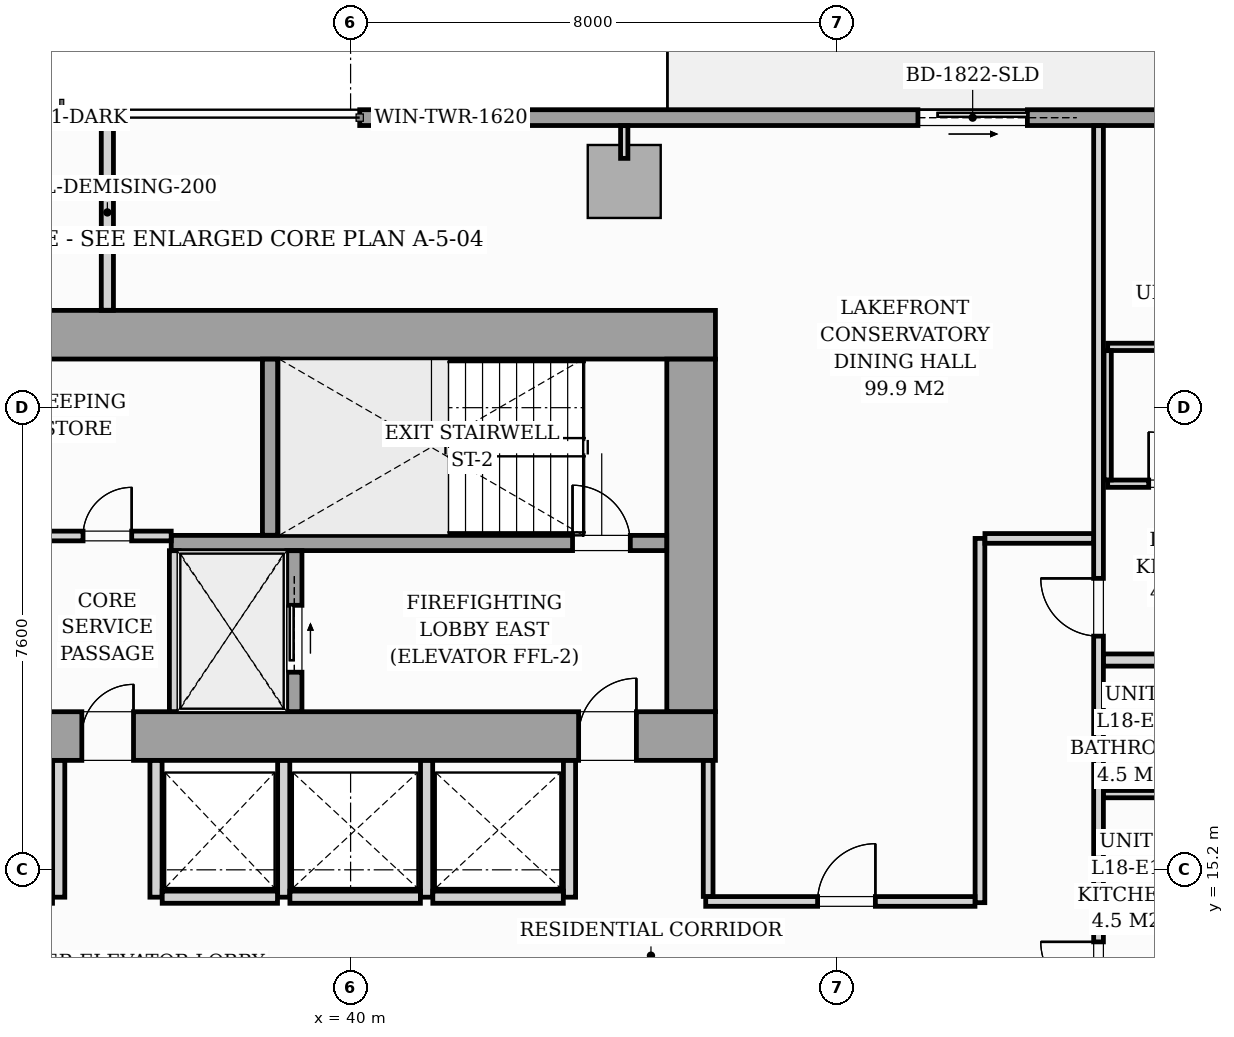
"""IFC4 building model, lengths in metres.
Left out: names, types, materials, properties, quantities, classifications, styles, units other than length and angle.
Written with IfcOpenShell. Run it as: python <this file> out.ifc"""

import sys

from ifc_helpers import new_model, si_unit, direction, frame, frame_2d, origin, origin_2d, place, context, subcontext, project, spatial, rectangle, i_section, extrude, source, transform, mapped, element, fill, save


model = new_model("IFC4")
c1 = context("Model", 3, precision=1e-05, world=origin(), true_north=direction((0.0, 1.0)))
c2 = subcontext(c1, "Body", "Model", "MODEL_VIEW")
j1 = project(units=[si_unit("LENGTHUNIT", "METRE"), si_unit("PLANEANGLEUNIT", "RADIAN")], contexts=[c1])
p1 = place(None, origin())
s1 = spatial("IfcSite", under=j1, at=p1, CompositionType="ELEMENT")
p2 = place(p1, origin())
s2 = spatial("IfcBuilding", under=s1, at=p2, CompositionType="ELEMENT")
p3 = place(p2, frame((0.0, 0.0, 64.6)))
s3 = spatial("IfcBuildingStorey", under=s2, at=p3, CompositionType="ELEMENT", Elevation=64.6)
m1 = source(origin(), c2, "Body", "SweptSolid", [
    extrude(i_section(OverallWidth=0.437, OverallDepth=0.514, WebThickness=0.061, FlangeThickness=0.097, FilletRadius=0.018, at=origin_2d()), origin(), (0.0, 0.0, 1.0), 3.196),
])
for number, where, z_axis, x_axis in (
    (1, (38.88, 17.4, 0.002), (0.0, 0.0, 1.0), (1.0, 0.0, 0.0)),
    (2, (45.6, 17.4, 0.002), (0.0, 0.0, 1.0), (1.0, 0.0, 0.0)),
    (3, (38.88, 24.0, 0.002), (0.0, 0.0, 1.0), (1.0, 0.0, 0.0)),
    (4, (45.6, 24.0, 0.002), (0.0, 0.0, 1.0), (1.0, 0.0, 0.0)),
):
    element("IfcColumn", number, at=place(p3, frame(where, z_axis=z_axis, x_axis=x_axis)), inside=s3, PredefinedType="PILASTER", context=c2, shape_type="MappedRepresentation", body=[
        mapped(m1, transform((0.0, 0.0, 0.0), scale=1.0)),
    ])
m2 = source(origin(), c2, "Body", "SweptSolid", [
    extrude(rectangle(XDim=1.2, YDim=1.2, at=origin_2d()), origin(), (0.0, 0.0, 1.0), 3.194),
])
p4 = place(p3, frame((44.5, 26.52, 0.002), z_axis=(0.0, 0.0, 1.0), x_axis=(1.0, 0.0, 0.0)))
e5 = element("IfcColumn", 5, at=p4, inside=s3, PredefinedType="COLUMN", context=c2, shape_type="MappedRepresentation", body=[
    mapped(m2, transform((0.0, 0.0, 0.0), scale=1.0)),
])
p5 = place(p3, frame((40.15, 27.57, 0.0), z_axis=(0.0, 0.0, 1.0), x_axis=(1.0, 0.0, 0.0)))
e6 = element("IfcWall", 6, at=p5, inside=s3, PredefinedType="STANDARD", context=c2, shape_type="SweptSolid", body=[
    extrude(rectangle(XDim=17.15, YDim=0.26, at=frame_2d((8.575, 0.0))), origin(), (0.0, 0.0, 1.0), 2.9),
])
p6 = place(p5, frame((9.18, 0.0, 0.0)))
e7 = element("IfcOpeningElement", 7, at=p6, cuts=e6, PredefinedType="OPENING", context=c2, shape_type="SweptSolid", body=[
    extrude(rectangle(XDim=1.8, YDim=2.06, at=frame_2d((0.9, 1.03))), frame((0.0, 0.14, 0.0), z_axis=(0.0, -1.0, 0.0), x_axis=(1.0, 0.0, 0.0)), (0.0, 0.0, 1.0), 0.28),
])
p7 = place(p5, frame((0.7, 0.0, 0.65)))
e8 = element("IfcOpeningElement", 8, at=p7, cuts=e6, PredefinedType="OPENING", context=c2, shape_type="SweptSolid", body=[
    extrude(rectangle(XDim=1.6, YDim=1.5, at=frame_2d((0.8, 0.75))), frame((0.0, 0.14, 0.0), z_axis=(0.0, -1.0, 0.0), x_axis=(1.0, 0.0, 0.0)), (0.0, 0.0, 1.0), 0.28),
])
p8 = place(p3, frame((26.0, 17.4, 0.0), z_axis=(0.0, 0.0, 1.0), x_axis=(1.0, 0.0, 0.0)))
e9 = element("IfcWall", 9, at=p8, inside=s3, PredefinedType="SHEAR", context=c2, shape_type="SweptSolid", body=[
    extrude(rectangle(XDim=20.0, YDim=0.8, at=frame_2d((10.0, 0.0))), origin(), (0.0, 0.0, 1.0), 3.2),
])
p9 = place(p8, frame((1.15, 0.0, 0.0)))
e10 = element("IfcOpeningElement", 10, at=p9, cuts=e9, PredefinedType="OPENING", context=c2, shape_type="SweptSolid", body=[
    extrude(rectangle(XDim=0.95, YDim=2.06, at=frame_2d((0.475, 1.03))), frame((0.0, 0.41, 0.0), z_axis=(0.0, -1.0, 0.0), x_axis=(1.0, 0.0, 0.0)), (0.0, 0.0, 1.0), 0.82),
])
p10 = place(p8, frame((9.58, 0.0, 0.0)))
e11 = element("IfcOpeningElement", 11, at=p10, cuts=e9, PredefinedType="OPENING", context=c2, shape_type="SweptSolid", body=[
    extrude(rectangle(XDim=0.85, YDim=2.0, at=frame_2d((0.425, 1.0))), frame((0.0, 0.41, 0.0), z_axis=(0.0, -1.0, 0.0), x_axis=(1.0, 0.0, 0.0)), (0.0, 0.0, 1.0), 0.82),
])
p11 = place(p8, frame((17.75, 0.0, 0.0)))
e12 = element("IfcOpeningElement", 12, at=p11, cuts=e9, PredefinedType="OPENING", context=c2, shape_type="SweptSolid", body=[
    extrude(rectangle(XDim=0.95, YDim=2.06, at=frame_2d((0.475, 1.03))), frame((0.0, 0.41, 0.0), z_axis=(0.0, -1.0, 0.0), x_axis=(1.0, 0.0, 0.0)), (0.0, 0.0, 1.0), 0.82),
])
p12 = place(p3, frame((26.0, 24.0, 0.0), z_axis=(0.0, 0.0, 1.0), x_axis=(1.0, 0.0, 0.0)))
e13 = element("IfcWall", 13, at=p12, inside=s3, PredefinedType="SHEAR", context=c2, shape_type="SweptSolid", body=[
    extrude(rectangle(XDim=20.0, YDim=0.8, at=frame_2d((10.0, 0.0))), origin(), (0.0, 0.0, 1.0), 3.2),
])
p13 = place(p3, frame((45.6, 17.802, 0.0), z_axis=(0.0, 0.0, 1.0), x_axis=(0.0, 1.0, 0.0)))
e14 = element("IfcWall", 14, at=p13, inside=s3, PredefinedType="SHEAR", context=c2, shape_type="SweptSolid", body=[
    extrude(rectangle(XDim=5.796, YDim=0.8, at=frame_2d((2.898, 0.0))), origin(), (0.0, 0.0, 1.0), 3.2),
])
p14 = place(p3, frame((37.05, 20.575, 0.0), z_axis=(0.0, 0.0, 1.0), x_axis=(1.0, 0.0, 0.0)))
e15 = element("IfcWall", 15, at=p14, inside=s3, PredefinedType="SOLIDWALL", context=c2, shape_type="SweptSolid", body=[
    extrude(rectangle(XDim=8.148, YDim=0.25, at=frame_2d((4.074, 0.0))), origin(), (0.0, 0.0, 1.0), 3.2),
])
p15 = place(p14, frame((6.6, 0.0, 0.0)))
e16 = element("IfcOpeningElement", 16, at=p15, cuts=e15, PredefinedType="OPENING", context=c2, shape_type="SweptSolid", body=[
    extrude(rectangle(XDim=0.95, YDim=2.06, at=frame_2d((0.475, 1.03))), frame((0.0, 0.135, 0.0), z_axis=(0.0, -1.0, 0.0), x_axis=(1.0, 0.0, 0.0)), (0.0, 0.0, 1.0), 0.27),
])
p16 = place(p3, frame((38.675, 20.702, 0.0), z_axis=(0.0, 0.0, 1.0), x_axis=(0.0, 1.0, 0.0)))
e17 = element("IfcWall", 17, at=p16, inside=s3, PredefinedType="SOLIDWALL", context=c2, shape_type="SweptSolid", body=[
    extrude(rectangle(XDim=2.896, YDim=0.25, at=frame_2d((1.448, 0.0))), origin(), (0.0, 0.0, 1.0), 3.2),
])
p17 = place(p3, frame((37.1, 17.802, 0.0), z_axis=(0.0, 0.0, 1.0), x_axis=(0.0, 1.0, 0.0)))
e18 = element("IfcWall", 18, at=p17, inside=s3, PredefinedType="PARTITIONING", context=c2, shape_type="SweptSolid", body=[
    extrude(rectangle(XDim=2.646, YDim=0.16, at=frame_2d((1.323, 0.0))), origin(), (0.0, 0.0, 1.0), 2.9),
])
p18 = place(p3, frame((39.075, 17.802, 0.0), z_axis=(0.0, 0.0, 1.0), x_axis=(0.0, 1.0, 0.0)))
e19 = element("IfcWall", 19, at=p18, inside=s3, PredefinedType="SOLIDWALL", context=c2, shape_type="SweptSolid", body=[
    extrude(rectangle(XDim=2.646, YDim=0.25, at=frame_2d((1.323, 0.0))), origin(), (0.0, 0.0, 1.0), 3.2),
])
p19 = place(p18, frame((0.648, 0.0, 0.0)))
e20 = element("IfcOpeningElement", 20, at=p19, cuts=e19, PredefinedType="OPENING", context=c2, shape_type="SweptSolid", body=[
    extrude(rectangle(XDim=1.1, YDim=2.08, at=frame_2d((0.55, 1.04))), frame((0.0, 0.135, 0.0), z_axis=(0.0, -1.0, 0.0), x_axis=(1.0, 0.0, 0.0)), (0.0, 0.0, 1.0), 0.27),
])
p20 = place(p3, frame((34.95, 20.69, 0.0), z_axis=(0.0, 0.0, 1.0), x_axis=(1.0, 0.0, 0.0)))
e21 = element("IfcWall", 21, at=p20, inside=s3, PredefinedType="PARTITIONING", context=c2, shape_type="SweptSolid", body=[
    extrude(rectangle(XDim=2.1, YDim=0.16, at=frame_2d((1.05, 0.0))), origin(), (0.0, 0.0, 1.0), 2.9),
])
p21 = place(p20, frame((0.65, 0.0, 0.0)))
e22 = element("IfcOpeningElement", 22, at=p21, cuts=e21, PredefinedType="OPENING", context=c2, shape_type="SweptSolid", body=[
    extrude(rectangle(XDim=0.8, YDim=2.05, at=frame_2d((0.4, 1.025))), frame((0.0, 0.09, 0.0), z_axis=(0.0, -1.0, 0.0), x_axis=(1.0, 0.0, 0.0)), (0.0, 0.0, 1.0), 0.18),
])
for number, where, z_axis, x_axis in (
    (23, (35.2, 14.75, 0.0), (0.0, 0.0, 1.0), (0.0, 1.0, 0.0)),
    (24, (36.8, 14.75, 0.0), (0.0, 0.0, 1.0), (0.0, 1.0, 0.0)),
    (25, (38.9, 14.75, 0.0), (0.0, 0.0, 1.0), (0.0, 1.0, 0.0)),
):
    element("IfcWall", number, at=place(p3, frame(where, z_axis=z_axis, x_axis=x_axis)), inside=s3, PredefinedType="PARTITIONING", context=c2, shape_type="SweptSolid", body=[
        extrude(rectangle(XDim=2.248, YDim=0.2, at=frame_2d((1.124, 0.0))), origin(), (0.0, 0.0, 1.0), 2.9),
    ])
p22 = place(p3, frame((36.902, 14.75, 0.0), z_axis=(0.0, 0.0, 1.0), x_axis=(1.0, 0.0, 0.0)))
e26 = element("IfcWall", 26, at=p22, inside=s3, PredefinedType="PARTITIONING", context=c2, shape_type="SweptSolid", body=[
    extrude(rectangle(XDim=1.896, YDim=0.2, at=frame_2d((0.948, 0.0))), origin(), (0.0, 0.0, 1.0), 2.9),
])
for number, where, z_axis, x_axis in (
    (27, (41.25, 14.75, 0.0), (0.0, 0.0, 1.0), (0.0, 1.0, 0.0)),
    (28, (43.6, 14.75, 0.0), (0.0, 0.0, 1.0), (0.0, 1.0, 0.0)),
):
    element("IfcWall", number, at=place(p3, frame(where, z_axis=z_axis, x_axis=x_axis)), inside=s3, PredefinedType="PARTITIONING", context=c2, shape_type="SweptSolid", body=[
        extrude(rectangle(XDim=2.248, YDim=0.2, at=frame_2d((1.124, 0.0))), origin(), (0.0, 0.0, 1.0), 2.9),
    ])
for number, where, z_axis, x_axis in (
    (29, (39.002, 14.75, 0.0), (0.0, 0.0, 1.0), (1.0, 0.0, 0.0)),
    (30, (41.352, 14.75, 0.0), (0.0, 0.0, 1.0), (1.0, 0.0, 0.0)),
):
    element("IfcWall", number, at=place(p3, frame(where, z_axis=z_axis, x_axis=x_axis)), inside=s3, PredefinedType="PARTITIONING", context=c2, shape_type="SweptSolid", body=[
        extrude(rectangle(XDim=2.146, YDim=0.2, at=frame_2d((1.073, 0.0))), origin(), (0.0, 0.0, 1.0), 2.9),
    ])
p23 = place(p3, frame((52.3, 12.572, 0.0), z_axis=(0.0, 0.0, 1.0), x_axis=(0.0, 1.0, 0.0)))
e31 = element("IfcWall", 31, at=p23, inside=s3, PredefinedType="PARTITIONING", context=c2, shape_type="SweptSolid", body=[
    extrude(rectangle(XDim=14.866, YDim=0.16, at=frame_2d((7.433, 0.0))), origin(), (0.0, 0.0, 1.0), 2.9),
])
p24 = place(p23, frame((0.493, 0.0, 0.0)))
e32 = element("IfcOpeningElement", 32, at=p24, cuts=e31, PredefinedType="OPENING", context=c2, shape_type="SweptSolid", body=[
    extrude(rectangle(XDim=0.95, YDim=2.06, at=frame_2d((0.475, 1.03))), frame((0.0, 0.09, 0.0), z_axis=(0.0, -1.0, 0.0), x_axis=(1.0, 0.0, 0.0)), (0.0, 0.0, 1.0), 0.18),
])
p25 = place(p23, frame((6.471, 0.0, 0.0)))
e33 = element("IfcOpeningElement", 33, at=p25, cuts=e31, PredefinedType="OPENING", context=c2, shape_type="SweptSolid", body=[
    extrude(rectangle(XDim=0.95, YDim=2.06, at=frame_2d((0.475, 1.03))), frame((0.0, 0.09, 0.0), z_axis=(0.0, -1.0, 0.0), x_axis=(1.0, 0.0, 0.0)), (0.0, 0.0, 1.0), 0.18),
])
p26 = place(p3, frame((36.0, 24.402, 0.0), z_axis=(0.0, 0.0, 1.0), x_axis=(0.0, 1.0, 0.0)))
e34 = element("IfcWall", 34, at=p26, inside=s3, PredefinedType="PARTITIONING", context=c2, shape_type="SweptSolid", body=[
    extrude(rectangle(XDim=3.218, YDim=0.2, at=frame_2d((1.609, 0.0))), origin(), (0.0, 0.0, 1.0), 2.9),
])
p27 = place(p3, frame((52.382, 18.65, 0.0), z_axis=(0.0, 0.0, 1.0), x_axis=(1.0, 0.0, 0.0)))
e35 = element("IfcWall", 35, at=p27, inside=s3, PredefinedType="PARTITIONING", context=c2, shape_type="SweptSolid", body=[
    extrude(rectangle(XDim=7.338, YDim=0.2, at=frame_2d((3.669, 0.0))), origin(), (0.0, 0.0, 1.0), 2.9),
])
p28 = place(p3, frame((52.382, 16.445, 0.0), z_axis=(0.0, 0.0, 1.0), x_axis=(1.0, 0.0, 0.0)))
e36 = element("IfcWall", 36, at=p28, inside=s3, PredefinedType="PARTITIONING", context=c2, shape_type="SweptSolid", body=[
    extrude(rectangle(XDim=2.256, YDim=0.12, at=frame_2d((1.128, 0.0))), origin(), (0.0, 0.0, 1.0), 2.005),
])
p29 = place(p3, frame((52.382, 14.34, 0.0), z_axis=(0.0, 0.0, 1.0), x_axis=(1.0, 0.0, 0.0)))
e37 = element("IfcWall", 37, at=p29, inside=s3, PredefinedType="PARTITIONING", context=c2, shape_type="SweptSolid", body=[
    extrude(rectangle(XDim=2.256, YDim=0.12, at=frame_2d((1.128, 0.0))), origin(), (0.0, 0.0, 1.0), 2.9),
])
p30 = place(p3, frame((52.45, 21.55, 0.0), z_axis=(0.0, 0.0, 1.0), x_axis=(1.0, 0.0, 0.0)))
e38 = element("IfcWall", 38, at=p30, inside=s3, PredefinedType="PARTITIONING", context=c2, shape_type="SweptSolid", body=[
    extrude(rectangle(XDim=4.2, YDim=0.12, at=frame_2d((2.1, 0.0))), origin(), (0.0, 0.0, 1.0), 2.9),
])
p31 = place(p30, frame((0.675, 0.0, 0.0)))
e39 = element("IfcOpeningElement", 39, at=p31, cuts=e38, PredefinedType="OPENING", context=c2, shape_type="SweptSolid", body=[
    extrude(rectangle(XDim=0.85, YDim=2.05, at=frame_2d((0.425, 1.025))), frame((0.0, 0.07, 0.0), z_axis=(0.0, -1.0, 0.0), x_axis=(1.0, 0.0, 0.0)), (0.0, 0.0, 1.0), 0.14),
])
p32 = place(p30, frame((2.8, 0.0, 0.0)))
e40 = element("IfcOpeningElement", 40, at=p32, cuts=e38, PredefinedType="OPENING", context=c2, shape_type="SweptSolid", body=[
    extrude(rectangle(XDim=0.8, YDim=2.0, at=frame_2d((0.4, 1.0))), frame((0.0, 0.07, 0.0), z_axis=(0.0, -1.0, 0.0), x_axis=(1.0, 0.0, 0.0)), (0.0, 0.0, 1.0), 0.14),
])
p33 = place(p3, frame((52.45, 23.8, 0.0), z_axis=(0.0, 0.0, 1.0), x_axis=(1.0, 0.0, 0.0)))
e41 = element("IfcWall", 41, at=p33, inside=s3, PredefinedType="PARTITIONING", context=c2, shape_type="SweptSolid", body=[
    extrude(rectangle(XDim=4.2, YDim=0.12, at=frame_2d((2.1, 0.0))), origin(), (0.0, 0.0, 1.0), 2.9),
])
p34 = place(p3, frame((52.45, 21.612, 0.0), z_axis=(0.0, 0.0, 1.0), x_axis=(0.0, 1.0, 0.0)))
e42 = element("IfcWall", 42, at=p34, inside=s3, PredefinedType="PARTITIONING", context=c2, shape_type="SweptSolid", body=[
    extrude(rectangle(XDim=2.126, YDim=0.12, at=frame_2d((1.063, 0.0))), origin(), (0.0, 0.0, 1.0), 2.9),
])
p35 = place(p3, frame((50.35, 14.66, 0.0), z_axis=(0.0, 0.0, 1.0), x_axis=(0.0, 1.0, 0.0)))
e43 = element("IfcWall", 43, at=p35, inside=s3, PredefinedType="PARTITIONING", context=c2, shape_type="SweptSolid", body=[
    extrude(rectangle(XDim=5.99, YDim=0.16, at=frame_2d((2.995, 0.0))), origin(), (0.0, 0.0, 1.0), 2.9),
])
p36 = place(p3, frame((50.432, 20.65, 0.0), z_axis=(0.0, 0.0, 1.0), x_axis=(1.0, 0.0, 0.0)))
e44 = element("IfcWall", 44, at=p36, inside=s3, PredefinedType="PARTITIONING", context=c2, shape_type="SweptSolid", body=[
    extrude(rectangle(XDim=1.786, YDim=0.16, at=frame_2d((0.893, 0.0))), origin(), (0.0, 0.0, 1.0), 2.9),
])
p37 = place(p3, frame((45.84, 14.68, 0.0), z_axis=(0.0, 0.0, 1.0), x_axis=(1.0, 0.0, 0.0)))
e45 = element("IfcWall", 45, at=p37, inside=s3, PredefinedType="PARTITIONING", context=c2, shape_type="SweptSolid", body=[
    extrude(rectangle(XDim=4.428, YDim=0.16, at=frame_2d((2.214, 0.0))), origin(), (0.0, 0.0, 1.0), 2.9),
])
p38 = place(p37, frame((1.84, 0.0, 0.0)))
e46 = element("IfcOpeningElement", 46, at=p38, cuts=e45, PredefinedType="OPENING", context=c2, shape_type="SweptSolid", body=[
    extrude(rectangle(XDim=0.95, YDim=2.06, at=frame_2d((0.475, 1.03))), frame((0.0, 0.09, 0.0), z_axis=(0.0, -1.0, 0.0), x_axis=(1.0, 0.0, 0.0)), (0.0, 0.0, 1.0), 0.18),
])
p39 = place(p3, frame((45.88, 14.762, 0.0), z_axis=(0.0, 0.0, 1.0), x_axis=(0.0, 1.0, 0.0)))
e47 = element("IfcWall", 47, at=p39, inside=s3, PredefinedType="PARTITIONING", context=c2, shape_type="SweptSolid", body=[
    extrude(rectangle(XDim=2.236, YDim=0.16, at=frame_2d((1.118, 0.0))), origin(), (0.0, 0.0, 1.0), 2.9),
])
p40 = place(p3, frame((44.5, 26.9, 0.0), z_axis=(0.0, 0.0, 1.0), x_axis=(0.0, 1.0, 0.0)))
e48 = element("IfcWall", 48, at=p40, inside=s3, PredefinedType="PARTITIONING", context=c2, shape_type="SweptSolid", body=[
    extrude(rectangle(XDim=0.538, YDim=0.12, at=frame_2d((0.269, 0.0))), origin(), (0.0, 0.0, 1.0), 2.9),
])
m3 = source(origin(), c2, "Body", "SweptSolid", [
    extrude(rectangle(XDim=1.8, YDim=2.06, at=frame_2d((0.9, 1.03))), frame((0.0, 0.025, 0.0), z_axis=(0.0, -1.0, 0.0), x_axis=(1.0, 0.0, 0.0)), (0.0, 0.0, 1.0), 0.05),
])
p41 = place(p6, origin())
e49 = element("IfcDoor", 49, at=p41, inside=s3, OperationType="SLIDING_TO_RIGHT", PredefinedType="DOOR", context=c2, shape_type="MappedRepresentation", body=[
    mapped(m3, transform((0.0, 0.0, 0.0), scale=1.0)),
])
fill(e7, e49)
m4 = source(origin(), c2, "Body", "SweptSolid", [
    extrude(rectangle(XDim=1.6, YDim=1.5, at=frame_2d((0.8, 0.75))), frame((0.0, 0.03, 0.0), z_axis=(0.0, -1.0, 0.0), x_axis=(1.0, 0.0, 0.0)), (0.0, 0.0, 1.0), 0.06),
])
p42 = place(p7, origin())
e50 = element("IfcWindow", 50, at=p42, inside=s3, PartitioningType="SINGLE_PANEL", PredefinedType="WINDOW", context=c2, shape_type="MappedRepresentation", body=[
    mapped(m4, transform((0.0, 0.0, 0.0), scale=1.0)),
])
fill(e8, e50)
m5 = source(origin(), c2, "Body", "SweptSolid", [
    extrude(rectangle(XDim=0.85, YDim=2.0, at=frame_2d((0.425, 1.0))), frame((0.0, 0.025, 0.0), z_axis=(0.0, -1.0, 0.0), x_axis=(1.0, 0.0, 0.0)), (0.0, 0.0, 1.0), 0.05),
])
p43 = place(p10, origin())
e51 = element("IfcDoor", 51, at=p43, inside=s3, OperationType="SINGLE_SWING_RIGHT", PredefinedType="DOOR", context=c2, shape_type="MappedRepresentation", body=[
    mapped(m5, transform((0.0, 0.0, 0.0), scale=1.0)),
])
fill(e11, e51)
m6 = source(origin(), c2, "Body", "SweptSolid", [
    extrude(rectangle(XDim=0.95, YDim=2.06, at=frame_2d((0.475, 1.03))), frame((0.0, 0.025, 0.0), z_axis=(0.0, -1.0, 0.0), x_axis=(1.0, 0.0, 0.0)), (0.0, 0.0, 1.0), 0.05),
])
p44 = place(p11, origin())
e52 = element("IfcDoor", 52, at=p44, inside=s3, OperationType="SINGLE_SWING_RIGHT", PredefinedType="DOOR", context=c2, shape_type="MappedRepresentation", body=[
    mapped(m6, transform((0.0, 0.0, 0.0), scale=1.0)),
])
fill(e12, e52)
p45 = place(p15, origin())
e53 = element("IfcDoor", 53, at=p45, inside=s3, OperationType="SINGLE_SWING_LEFT", PredefinedType="DOOR", context=c2, shape_type="MappedRepresentation", body=[
    mapped(m6, transform((0.0, 0.0, 0.0), scale=1.0)),
])
fill(e16, e53)
m7 = source(origin(), c2, "Body", "SweptSolid", [
    extrude(rectangle(XDim=1.1, YDim=2.08, at=frame_2d((0.55, 1.04))), frame((0.0, 0.025, 0.0), z_axis=(0.0, -1.0, 0.0), x_axis=(1.0, 0.0, 0.0)), (0.0, 0.0, 1.0), 0.05),
])
p46 = place(p19, origin())
e54 = element("IfcDoor", 54, at=p46, inside=s3, OperationType="SLIDING_TO_RIGHT", PredefinedType="DOOR", context=c2, shape_type="MappedRepresentation", body=[
    mapped(m7, transform((0.0, 0.0, 0.0), scale=1.0)),
])
fill(e20, e54)
m8 = source(origin(), c2, "Body", "SweptSolid", [
    extrude(rectangle(XDim=0.8, YDim=2.05, at=frame_2d((0.4, 1.025))), frame((0.0, 0.025, 0.0), z_axis=(0.0, -1.0, 0.0), x_axis=(1.0, 0.0, 0.0)), (0.0, 0.0, 1.0), 0.05),
])
p47 = place(p21, origin())
e55 = element("IfcDoor", 55, at=p47, inside=s3, OperationType="SINGLE_SWING_RIGHT", PredefinedType="DOOR", context=c2, shape_type="MappedRepresentation", body=[
    mapped(m8, transform((0.0, 0.0, 0.0), scale=1.0)),
])
fill(e22, e55)
m9 = source(origin(), c2, "Body", "SweptSolid", [
    extrude(rectangle(XDim=0.95, YDim=2.06, at=frame_2d((0.475, 1.03))), frame((0.0, 0.025, 0.0), z_axis=(0.0, -1.0, 0.0), x_axis=(1.0, 0.0, 0.0)), (0.0, 0.0, 1.0), 0.05),
])
p48 = place(p24, origin())
e56 = element("IfcDoor", 56, at=p48, inside=s3, OperationType="SINGLE_SWING_RIGHT", PredefinedType="DOOR", context=c2, shape_type="MappedRepresentation", body=[
    mapped(m9, transform((0.0, 0.0, 0.0), scale=1.0)),
])
fill(e32, e56)
p49 = place(p25, origin())
e57 = element("IfcDoor", 57, at=p49, inside=s3, OperationType="SINGLE_SWING_RIGHT", PredefinedType="DOOR", context=c2, shape_type="MappedRepresentation", body=[
    mapped(m9, transform((0.0, 0.0, 0.0), scale=1.0)),
])
fill(e33, e57)
m10 = source(origin(), c2, "Body", "SweptSolid", [
    extrude(rectangle(XDim=0.85, YDim=2.05, at=frame_2d((0.425, 1.025))), frame((0.0, 0.025, 0.0), z_axis=(0.0, -1.0, 0.0), x_axis=(1.0, 0.0, 0.0)), (0.0, 0.0, 1.0), 0.05),
])
p50 = place(p31, origin())
e58 = element("IfcDoor", 58, at=p50, inside=s3, OperationType="SINGLE_SWING_LEFT", PredefinedType="DOOR", context=c2, shape_type="MappedRepresentation", body=[
    mapped(m10, transform((0.0, 0.0, 0.0), scale=1.0)),
])
fill(e39, e58)
p51 = place(p38, origin())
e59 = element("IfcDoor", 59, at=p51, inside=s3, OperationType="SINGLE_SWING_RIGHT", PredefinedType="DOOR", context=c2, shape_type="MappedRepresentation", body=[
    mapped(m9, transform((0.0, 0.0, 0.0), scale=1.0)),
])
fill(e46, e59)
save(model, sys.argv[1])
